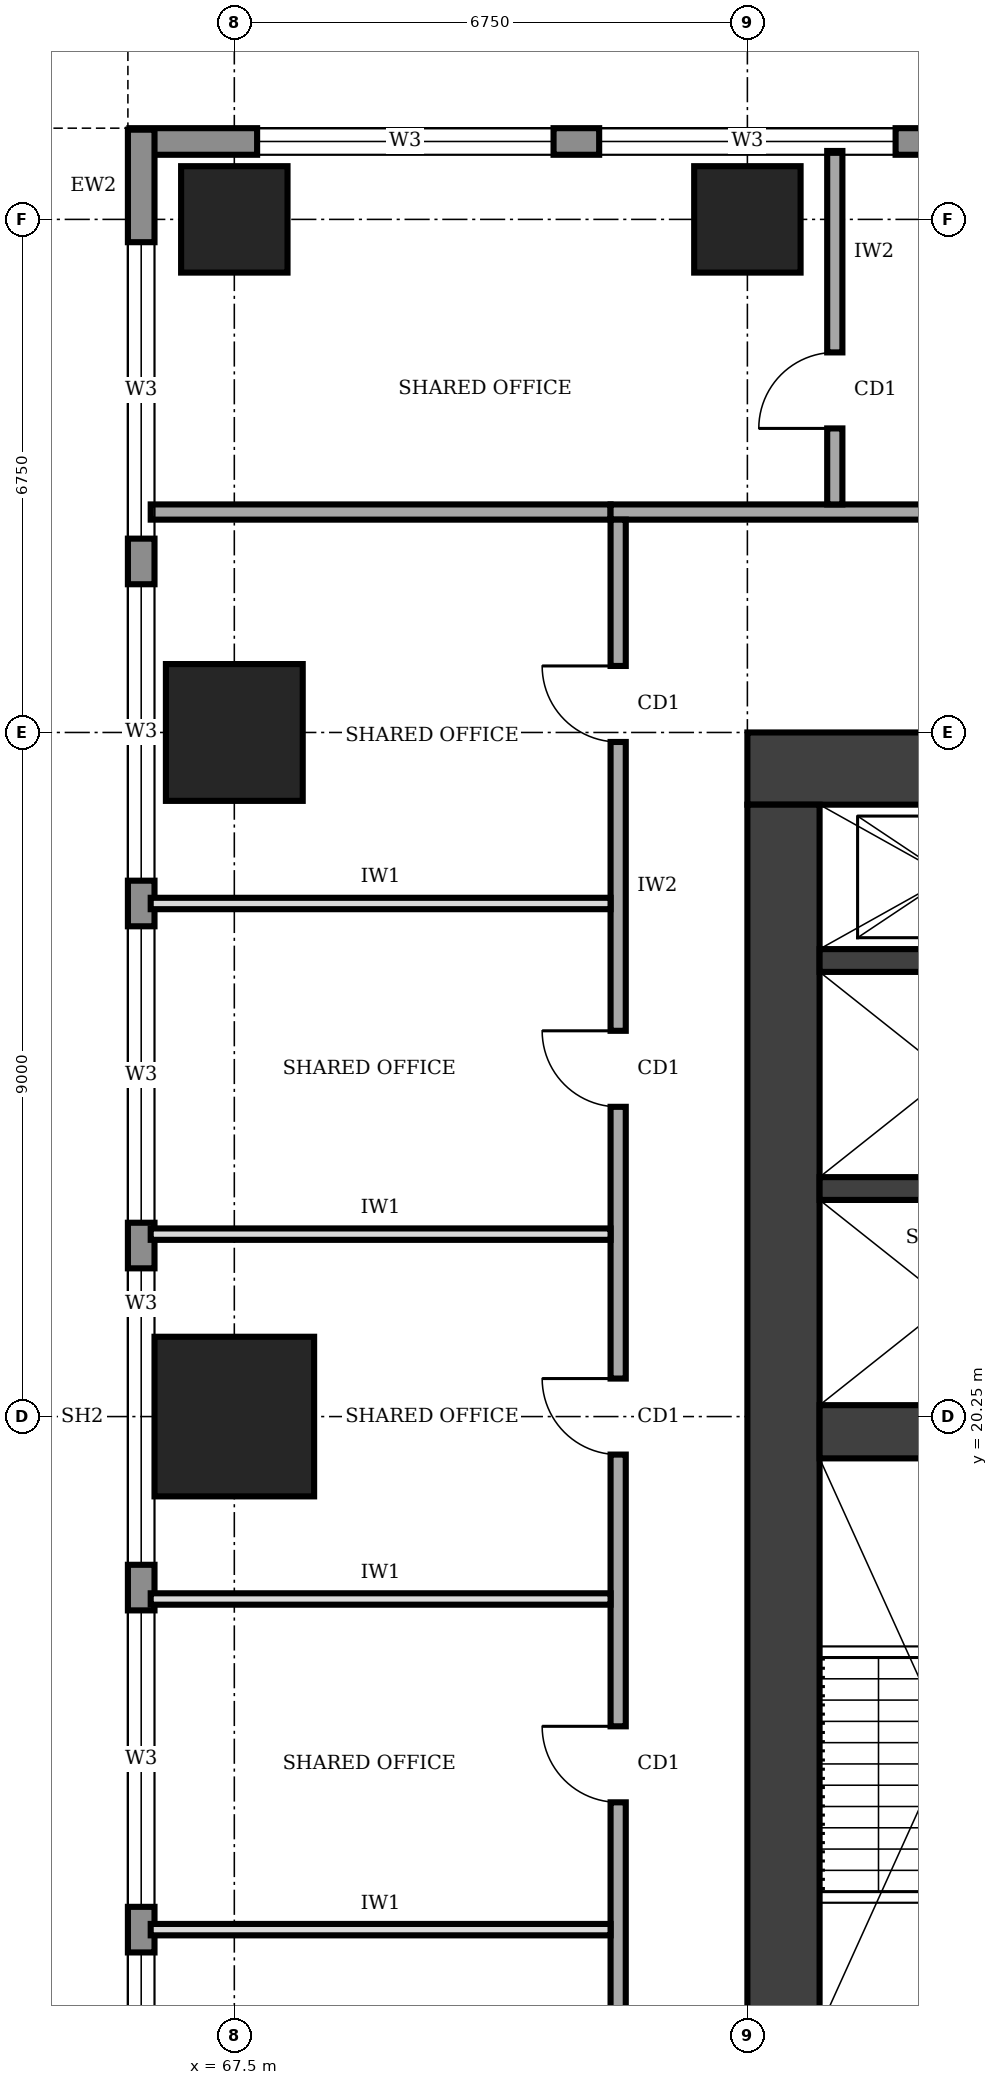
"""IFC4 building model, lengths in metres.
Left out: names, types, materials, properties, quantities, classifications, styles, units other than length and angle.
Written with IfcOpenShell. Run it as: python <this file> out.ifc"""

import sys

from ifc_helpers import new_model, si_unit, direction, frame, frame_2d, origin, origin_2d, place, context, subcontext, project, spatial, rectangle, extrude, element, fill, save


model = new_model("IFC4")
c1 = context("Model", 3, precision=1e-05, world=origin(), true_north=direction((0.0, 1.0)))
c2 = subcontext(c1, "Body", "Model", "MODEL_VIEW")
j1 = project(units=[si_unit("LENGTHUNIT", "METRE"), si_unit("PLANEANGLEUNIT", "RADIAN")], contexts=[c1])
p1 = place(None, origin())
s1 = spatial("IfcSite", under=j1, at=p1, CompositionType="ELEMENT")
p2 = place(p1, origin())
s2 = spatial("IfcBuilding", under=s1, at=p2, CompositionType="ELEMENT")
p3 = place(p2, frame((0.0, 0.0, 181.0)))
s3 = spatial("IfcBuildingStorey", under=s2, at=p3, CompositionType="ELEMENT", Elevation=181.0)
p4 = place(p3, frame((87.75, 28.775, 0.0), z_axis=(0.0, 0.0, 1.0), x_axis=(-1.0, 0.0, 0.0)))
e1 = element("IfcWall", 1, at=p4, inside=s3, PredefinedType="SHEAR", context=c2, shape_type="SweptSolid", body=[
    extrude(rectangle(XDim=13.5, YDim=0.95, at=frame_2d((6.75, 0.0))), origin(), (0.0, 0.0, 1.0), 4.0),
])
p5 = place(p4, frame((4.75, 0.0, 0.0)))
e2 = element("IfcOpeningElement", 2, at=p5, cuts=e1, PredefinedType="OPENING", context=c2, shape_type="SweptSolid", body=[
    extrude(rectangle(XDim=1.8, YDim=2.1, at=frame_2d((0.9, 1.05))), frame((0.0, 0.485, 0.0), z_axis=(0.0, -1.0, 0.0), x_axis=(1.0, 0.0, 0.0)), (0.0, 0.0, 1.0), 0.97),
])
p6 = place(p3, frame((74.725, 28.3, 0.0), z_axis=(0.0, 0.0, 1.0), x_axis=(0.0, -1.0, 0.0)))
e3 = element("IfcWall", 3, at=p6, inside=s3, PredefinedType="SHEAR", context=c2, shape_type="SweptSolid", body=[
    extrude(rectangle(XDim=16.1, YDim=0.95, at=frame_2d((8.05, 0.0))), origin(), (0.0, 0.0, 1.0), 4.0),
])
p7 = place(p3, frame((75.2, 20.05, 0.0), z_axis=(0.0, 0.0, 1.0), x_axis=(1.0, 0.0, 0.0)))
e4 = element("IfcWall", 4, at=p7, inside=s3, PredefinedType="SHEAR", context=c2, shape_type="SweptSolid", body=[
    extrude(rectangle(XDim=3.4, YDim=0.7, at=frame_2d((1.7, 0.0))), origin(), (0.0, 0.0, 1.0), 4.0),
])
for number, where, z_axis, x_axis in (
    (5, (75.2, 23.25, 0.0), (0.0, 0.0, 1.0), (1.0, 0.0, 0.0)),
    (6, (75.2, 26.25, 0.0), (0.0, 0.0, 1.0), (1.0, 0.0, 0.0)),
):
    element("IfcWall", number, at=place(p3, frame(where, z_axis=z_axis, x_axis=x_axis)), inside=s3, PredefinedType="SHEAR", context=c2, shape_type="SweptSolid", body=[
        extrude(rectangle(XDim=3.4, YDim=0.3, at=frame_2d((1.7, 0.0))), origin(), (0.0, 0.0, 1.0), 4.0),
    ])
p8 = place(p3, frame((67.5, 20.25, 0.0), z_axis=(0.0, 0.0, 1.0), x_axis=(1.0, 0.0, 0.0)))
e7 = element("IfcColumn", 7, at=p8, inside=s3, PredefinedType="COLUMN", context=c2, shape_type="SweptSolid", body=[
    extrude(rectangle(XDim=2.1, YDim=2.1, at=origin_2d()), origin(), (0.0, 0.0, 1.0), 4.0),
])
p9 = place(p3, frame((67.5, 29.25, 0.0), z_axis=(0.0, 0.0, 1.0), x_axis=(1.0, 0.0, 0.0)))
e8 = element("IfcColumn", 8, at=p9, inside=s3, PredefinedType="COLUMN", context=c2, shape_type="SweptSolid", body=[
    extrude(rectangle(XDim=1.8, YDim=1.8, at=origin_2d()), origin(), (0.0, 0.0, 1.0), 4.0),
])
for number, where, z_axis, x_axis in (
    (9, (67.5, 36.0, 0.0), (0.0, 0.0, 1.0), (1.0, 0.0, 0.0)),
    (10, (74.25, 36.0, 0.0), (0.0, 0.0, 1.0), (1.0, 0.0, 0.0)),
):
    element("IfcColumn", number, at=place(p3, frame(where, z_axis=z_axis, x_axis=x_axis)), inside=s3, PredefinedType="COLUMN", context=c2, shape_type="SweptSolid", body=[
        extrude(rectangle(XDim=1.4, YDim=1.4, at=origin_2d()), origin(), (0.0, 0.0, 1.0), 4.0),
    ])
p10 = place(p3, frame((96.03, 37.025, 0.0), z_axis=(0.0, 0.0, 1.0), x_axis=(-1.0, 0.0, 0.0)))
e11 = element("IfcWall", 11, at=p10, inside=s3, PredefinedType="STANDARD", context=c2, shape_type="SweptSolid", body=[
    extrude(rectangle(XDim=29.91, YDim=0.35, at=frame_2d((14.955, 0.0))), origin(), (0.0, 0.0, 1.0), 3.75),
])
p11 = place(p10, frame((24.33, 0.0, 0.95)))
e12 = element("IfcOpeningElement", 12, at=p11, cuts=e11, PredefinedType="OPENING", context=c2, shape_type="SweptSolid", body=[
    extrude(rectangle(XDim=3.9, YDim=1.8, at=frame_2d((1.95, 0.9))), frame((0.0, 0.185, 0.0), z_axis=(0.0, -1.0, 0.0), x_axis=(1.0, 0.0, 0.0)), (0.0, 0.0, 1.0), 0.37),
])
p12 = place(p10, frame((19.83, 0.0, 0.95)))
e13 = element("IfcOpeningElement", 13, at=p12, cuts=e11, PredefinedType="OPENING", context=c2, shape_type="SweptSolid", body=[
    extrude(rectangle(XDim=3.9, YDim=1.8, at=frame_2d((1.95, 0.9))), frame((0.0, 0.185, 0.0), z_axis=(0.0, -1.0, 0.0), x_axis=(1.0, 0.0, 0.0)), (0.0, 0.0, 1.0), 0.37),
])
p13 = place(p10, frame((15.33, 0.0, 0.95)))
e14 = element("IfcOpeningElement", 14, at=p13, cuts=e11, PredefinedType="OPENING", context=c2, shape_type="SweptSolid", body=[
    extrude(rectangle(XDim=3.9, YDim=1.8, at=frame_2d((1.95, 0.9))), frame((0.0, 0.185, 0.0), z_axis=(0.0, -1.0, 0.0), x_axis=(1.0, 0.0, 0.0)), (0.0, 0.0, 1.0), 0.37),
])
p14 = place(p10, frame((10.83, 0.0, 0.95)))
e15 = element("IfcOpeningElement", 15, at=p14, cuts=e11, PredefinedType="OPENING", context=c2, shape_type="SweptSolid", body=[
    extrude(rectangle(XDim=3.9, YDim=1.8, at=frame_2d((1.95, 0.9))), frame((0.0, 0.185, 0.0), z_axis=(0.0, -1.0, 0.0), x_axis=(1.0, 0.0, 0.0)), (0.0, 0.0, 1.0), 0.37),
])
p15 = place(p10, frame((6.33, 0.0, 0.95)))
e16 = element("IfcOpeningElement", 16, at=p15, cuts=e11, PredefinedType="OPENING", context=c2, shape_type="SweptSolid", body=[
    extrude(rectangle(XDim=3.9, YDim=1.8, at=frame_2d((1.95, 0.9))), frame((0.0, 0.185, 0.0), z_axis=(0.0, -1.0, 0.0), x_axis=(1.0, 0.0, 0.0)), (0.0, 0.0, 1.0), 0.37),
])
p16 = place(p10, frame((1.83, 0.0, 0.95)))
e17 = element("IfcOpeningElement", 17, at=p16, cuts=e11, PredefinedType="OPENING", context=c2, shape_type="SweptSolid", body=[
    extrude(rectangle(XDim=3.9, YDim=1.8, at=frame_2d((1.95, 0.9))), frame((0.0, 0.185, 0.0), z_axis=(0.0, -1.0, 0.0), x_axis=(1.0, 0.0, 0.0)), (0.0, 0.0, 1.0), 0.37),
])
p17 = place(p3, frame((66.275, 37.18, 0.0), z_axis=(0.0, 0.0, 1.0), x_axis=(0.0, -1.0, 0.0)))
e18 = element("IfcWall", 18, at=p17, inside=s3, PredefinedType="STANDARD", context=c2, shape_type="SweptSolid", body=[
    extrude(rectangle(XDim=33.86, YDim=0.35, at=frame_2d((16.93, 0.0))), origin(), (0.0, 0.0, 1.0), 3.75),
])
p18 = place(p17, frame((28.48, 0.0, 0.95)))
e19 = element("IfcOpeningElement", 19, at=p18, cuts=e18, PredefinedType="OPENING", context=c2, shape_type="SweptSolid", body=[
    extrude(rectangle(XDim=3.9, YDim=1.8, at=frame_2d((1.95, 0.9))), frame((0.0, 0.185, 0.0), z_axis=(0.0, -1.0, 0.0), x_axis=(1.0, 0.0, 0.0)), (0.0, 0.0, 1.0), 0.37),
])
p19 = place(p17, frame((23.98, 0.0, 0.95)))
e20 = element("IfcOpeningElement", 20, at=p19, cuts=e18, PredefinedType="OPENING", context=c2, shape_type="SweptSolid", body=[
    extrude(rectangle(XDim=3.9, YDim=1.8, at=frame_2d((1.95, 0.9))), frame((0.0, 0.185, 0.0), z_axis=(0.0, -1.0, 0.0), x_axis=(1.0, 0.0, 0.0)), (0.0, 0.0, 1.0), 0.37),
])
p20 = place(p17, frame((19.48, 0.0, 0.95)))
e21 = element("IfcOpeningElement", 21, at=p20, cuts=e18, PredefinedType="OPENING", context=c2, shape_type="SweptSolid", body=[
    extrude(rectangle(XDim=3.9, YDim=1.8, at=frame_2d((1.95, 0.9))), frame((0.0, 0.185, 0.0), z_axis=(0.0, -1.0, 0.0), x_axis=(1.0, 0.0, 0.0)), (0.0, 0.0, 1.0), 0.37),
])
p21 = place(p17, frame((14.98, 0.0, 0.95)))
e22 = element("IfcOpeningElement", 22, at=p21, cuts=e18, PredefinedType="OPENING", context=c2, shape_type="SweptSolid", body=[
    extrude(rectangle(XDim=3.9, YDim=1.8, at=frame_2d((1.95, 0.9))), frame((0.0, 0.185, 0.0), z_axis=(0.0, -1.0, 0.0), x_axis=(1.0, 0.0, 0.0)), (0.0, 0.0, 1.0), 0.37),
])
p22 = place(p17, frame((10.48, 0.0, 0.95)))
e23 = element("IfcOpeningElement", 23, at=p22, cuts=e18, PredefinedType="OPENING", context=c2, shape_type="SweptSolid", body=[
    extrude(rectangle(XDim=3.9, YDim=1.8, at=frame_2d((1.95, 0.9))), frame((0.0, 0.185, 0.0), z_axis=(0.0, -1.0, 0.0), x_axis=(1.0, 0.0, 0.0)), (0.0, 0.0, 1.0), 0.37),
])
p23 = place(p17, frame((5.98, 0.0, 0.95)))
e24 = element("IfcOpeningElement", 24, at=p23, cuts=e18, PredefinedType="OPENING", context=c2, shape_type="SweptSolid", body=[
    extrude(rectangle(XDim=3.9, YDim=1.8, at=frame_2d((1.95, 0.9))), frame((0.0, 0.185, 0.0), z_axis=(0.0, -1.0, 0.0), x_axis=(1.0, 0.0, 0.0)), (0.0, 0.0, 1.0), 0.37),
])
p24 = place(p17, frame((1.48, 0.0, 0.95)))
e25 = element("IfcOpeningElement", 25, at=p24, cuts=e18, PredefinedType="OPENING", context=c2, shape_type="SweptSolid", body=[
    extrude(rectangle(XDim=3.9, YDim=1.8, at=frame_2d((1.95, 0.9))), frame((0.0, 0.185, 0.0), z_axis=(0.0, -1.0, 0.0), x_axis=(1.0, 0.0, 0.0)), (0.0, 0.0, 1.0), 0.37),
])
p25 = place(p3, frame((89.35, 32.15, 0.0), z_axis=(0.0, 0.0, 1.0), x_axis=(-1.0, 0.0, 0.0)))
e26 = element("IfcWall", 26, at=p25, inside=s3, PredefinedType="SOLIDWALL", context=c2, shape_type="SweptSolid", body=[
    extrude(rectangle(XDim=16.9, YDim=0.2, at=frame_2d((8.45, 0.0))), origin(), (0.0, 0.0, 1.0), 3.75),
])
p26 = place(p25, frame((3.575, 0.0, 0.0)))
e27 = element("IfcOpeningElement", 27, at=p26, cuts=e26, PredefinedType="OPENING", context=c2, shape_type="SweptSolid", body=[
    extrude(rectangle(XDim=1.0, YDim=2.1, at=frame_2d((0.5, 1.05))), frame((0.0, 0.11, 0.0), z_axis=(0.0, -1.0, 0.0), x_axis=(1.0, 0.0, 0.0)), (0.0, 0.0, 1.0), 0.22),
])
p27 = place(p3, frame((72.55, 32.05, 0.0), z_axis=(0.0, 0.0, 1.0), x_axis=(0.0, -1.0, 0.0)))
e28 = element("IfcWall", 28, at=p27, inside=s3, PredefinedType="SOLIDWALL", context=c2, shape_type="SweptSolid", body=[
    extrude(rectangle(XDim=23.05, YDim=0.2, at=frame_2d((11.525, 0.0))), origin(), (0.0, 0.0, 1.0), 3.75),
])
p28 = place(p27, frame((20.3, 0.0, 0.0)))
e29 = element("IfcOpeningElement", 29, at=p28, cuts=e28, PredefinedType="OPENING", context=c2, shape_type="SweptSolid", body=[
    extrude(rectangle(XDim=1.0, YDim=2.1, at=frame_2d((0.5, 1.05))), frame((0.0, 0.11, 0.0), z_axis=(0.0, -1.0, 0.0), x_axis=(1.0, 0.0, 0.0)), (0.0, 0.0, 1.0), 0.22),
])
p29 = place(p27, frame((15.875, 0.0, 0.0)))
e30 = element("IfcOpeningElement", 30, at=p29, cuts=e28, PredefinedType="OPENING", context=c2, shape_type="SweptSolid", body=[
    extrude(rectangle(XDim=1.0, YDim=2.1, at=frame_2d((0.5, 1.05))), frame((0.0, 0.11, 0.0), z_axis=(0.0, -1.0, 0.0), x_axis=(1.0, 0.0, 0.0)), (0.0, 0.0, 1.0), 0.22),
])
p30 = place(p27, frame((11.3, 0.0, 0.0)))
e31 = element("IfcOpeningElement", 31, at=p30, cuts=e28, PredefinedType="OPENING", context=c2, shape_type="SweptSolid", body=[
    extrude(rectangle(XDim=1.0, YDim=2.1, at=frame_2d((0.5, 1.05))), frame((0.0, 0.11, 0.0), z_axis=(0.0, -1.0, 0.0), x_axis=(1.0, 0.0, 0.0)), (0.0, 0.0, 1.0), 0.22),
])
p31 = place(p27, frame((6.725, 0.0, 0.0)))
e32 = element("IfcOpeningElement", 32, at=p31, cuts=e28, PredefinedType="OPENING", context=c2, shape_type="SweptSolid", body=[
    extrude(rectangle(XDim=1.0, YDim=2.1, at=frame_2d((0.5, 1.05))), frame((0.0, 0.11, 0.0), z_axis=(0.0, -1.0, 0.0), x_axis=(1.0, 0.0, 0.0)), (0.0, 0.0, 1.0), 0.22),
])
p32 = place(p27, frame((1.925, 0.0, 0.0)))
e33 = element("IfcOpeningElement", 33, at=p32, cuts=e28, PredefinedType="OPENING", context=c2, shape_type="SweptSolid", body=[
    extrude(rectangle(XDim=1.0, YDim=2.1, at=frame_2d((0.5, 1.05))), frame((0.0, 0.11, 0.0), z_axis=(0.0, -1.0, 0.0), x_axis=(1.0, 0.0, 0.0)), (0.0, 0.0, 1.0), 0.22),
])
p33 = place(p3, frame((75.4, 32.25, 0.0), z_axis=(0.0, 0.0, 1.0), x_axis=(0.0, 1.0, 0.0)))
e34 = element("IfcWall", 34, at=p33, inside=s3, PredefinedType="SOLIDWALL", context=c2, shape_type="SweptSolid", body=[
    extrude(rectangle(XDim=4.65, YDim=0.2, at=frame_2d((2.325, 0.0))), origin(), (0.0, 0.0, 1.0), 3.75),
])
p34 = place(p33, frame((1.0, 0.0, 0.0)))
e35 = element("IfcOpeningElement", 35, at=p34, cuts=e34, PredefinedType="OPENING", context=c2, shape_type="SweptSolid", body=[
    extrude(rectangle(XDim=1.0, YDim=2.1, at=frame_2d((0.5, 1.05))), frame((0.0, 0.11, 0.0), z_axis=(0.0, -1.0, 0.0), x_axis=(1.0, 0.0, 0.0)), (0.0, 0.0, 1.0), 0.22),
])
p35 = place(p3, frame((66.4, 32.15, 0.0), z_axis=(0.0, 0.0, 1.0), x_axis=(1.0, 0.0, 0.0)))
e36 = element("IfcWall", 36, at=p35, inside=s3, PredefinedType="SOLIDWALL", context=c2, shape_type="SweptSolid", body=[
    extrude(rectangle(XDim=6.05, YDim=0.2, at=frame_2d((3.025, 0.0))), origin(), (0.0, 0.0, 1.0), 3.75),
])
for number, where, z_axis, x_axis in (
    (37, (66.4, 13.5, 0.0), (0.0, 0.0, 1.0), (1.0, 0.0, 0.0)),
    (38, (66.4, 17.85, 0.0), (0.0, 0.0, 1.0), (1.0, 0.0, 0.0)),
    (39, (66.4, 22.65, 0.0), (0.0, 0.0, 1.0), (1.0, 0.0, 0.0)),
    (40, (66.4, 27.0, 0.0), (0.0, 0.0, 1.0), (1.0, 0.0, 0.0)),
):
    element("IfcWall", number, at=place(p3, frame(where, z_axis=z_axis, x_axis=x_axis)), inside=s3, PredefinedType="PARTITIONING", context=c2, shape_type="SweptSolid", body=[
        extrude(rectangle(XDim=6.05, YDim=0.15, at=frame_2d((3.025, 0.0))), origin(), (0.0, 0.0, 1.0), 3.75),
    ])
p36 = place(p11, origin())
e41 = element("IfcWindow", 41, at=p36, inside=s3, PartitioningType="SINGLE_PANEL", PredefinedType="WINDOW", context=c2, shape_type="SweptSolid", body=[
    extrude(rectangle(XDim=3.9, YDim=1.8, at=frame_2d((1.95, 0.9))), frame((0.0, 0.03, 0.0), z_axis=(0.0, -1.0, 0.0), x_axis=(1.0, 0.0, 0.0)), (0.0, 0.0, 1.0), 0.06),
])
fill(e12, e41)
p37 = place(p12, origin())
e42 = element("IfcWindow", 42, at=p37, inside=s3, PartitioningType="SINGLE_PANEL", PredefinedType="WINDOW", context=c2, shape_type="SweptSolid", body=[
    extrude(rectangle(XDim=3.9, YDim=1.8, at=frame_2d((1.95, 0.9))), frame((0.0, 0.03, 0.0), z_axis=(0.0, -1.0, 0.0), x_axis=(1.0, 0.0, 0.0)), (0.0, 0.0, 1.0), 0.06),
])
fill(e13, e42)
p38 = place(p19, origin())
e43 = element("IfcWindow", 43, at=p38, inside=s3, PartitioningType="SINGLE_PANEL", PredefinedType="WINDOW", context=c2, shape_type="SweptSolid", body=[
    extrude(rectangle(XDim=3.9, YDim=1.8, at=frame_2d((1.95, 0.9))), frame((0.0, 0.03, 0.0), z_axis=(0.0, -1.0, 0.0), x_axis=(1.0, 0.0, 0.0)), (0.0, 0.0, 1.0), 0.06),
])
fill(e20, e43)
p39 = place(p20, origin())
e44 = element("IfcWindow", 44, at=p39, inside=s3, PartitioningType="SINGLE_PANEL", PredefinedType="WINDOW", context=c2, shape_type="SweptSolid", body=[
    extrude(rectangle(XDim=3.9, YDim=1.8, at=frame_2d((1.95, 0.9))), frame((0.0, 0.03, 0.0), z_axis=(0.0, -1.0, 0.0), x_axis=(1.0, 0.0, 0.0)), (0.0, 0.0, 1.0), 0.06),
])
fill(e21, e44)
p40 = place(p21, origin())
e45 = element("IfcWindow", 45, at=p40, inside=s3, PartitioningType="SINGLE_PANEL", PredefinedType="WINDOW", context=c2, shape_type="SweptSolid", body=[
    extrude(rectangle(XDim=3.9, YDim=1.8, at=frame_2d((1.95, 0.9))), frame((0.0, 0.03, 0.0), z_axis=(0.0, -1.0, 0.0), x_axis=(1.0, 0.0, 0.0)), (0.0, 0.0, 1.0), 0.06),
])
fill(e22, e45)
p41 = place(p22, origin())
e46 = element("IfcWindow", 46, at=p41, inside=s3, PartitioningType="SINGLE_PANEL", PredefinedType="WINDOW", context=c2, shape_type="SweptSolid", body=[
    extrude(rectangle(XDim=3.9, YDim=1.8, at=frame_2d((1.95, 0.9))), frame((0.0, 0.03, 0.0), z_axis=(0.0, -1.0, 0.0), x_axis=(1.0, 0.0, 0.0)), (0.0, 0.0, 1.0), 0.06),
])
fill(e23, e46)
p42 = place(p23, origin())
e47 = element("IfcWindow", 47, at=p42, inside=s3, PartitioningType="SINGLE_PANEL", PredefinedType="WINDOW", context=c2, shape_type="SweptSolid", body=[
    extrude(rectangle(XDim=3.9, YDim=1.8, at=frame_2d((1.95, 0.9))), frame((0.0, 0.03, 0.0), z_axis=(0.0, -1.0, 0.0), x_axis=(1.0, 0.0, 0.0)), (0.0, 0.0, 1.0), 0.06),
])
fill(e24, e47)
p43 = place(p24, origin())
e48 = element("IfcWindow", 48, at=p43, inside=s3, PartitioningType="SINGLE_PANEL", PredefinedType="WINDOW", context=c2, shape_type="SweptSolid", body=[
    extrude(rectangle(XDim=3.9, YDim=1.8, at=frame_2d((1.95, 0.9))), frame((0.0, 0.03, 0.0), z_axis=(0.0, -1.0, 0.0), x_axis=(1.0, 0.0, 0.0)), (0.0, 0.0, 1.0), 0.06),
])
fill(e25, e48)
p44 = place(p29, frame((1.0, 0.0, 0.0), z_axis=(0.0, 0.0, 1.0), x_axis=(-1.0, 0.0, 0.0)))
e49 = element("IfcDoor", 49, at=p44, inside=s3, OperationType="SINGLE_SWING_RIGHT", PredefinedType="DOOR", context=c2, shape_type="SweptSolid", body=[
    extrude(rectangle(XDim=1.0, YDim=2.1, at=frame_2d((0.5, 1.05))), frame((0.0, 0.025, 0.0), z_axis=(0.0, -1.0, 0.0), x_axis=(1.0, 0.0, 0.0)), (0.0, 0.0, 1.0), 0.05),
])
fill(e30, e49)
p45 = place(p30, frame((1.0, 0.0, 0.0), z_axis=(0.0, 0.0, 1.0), x_axis=(-1.0, 0.0, 0.0)))
e50 = element("IfcDoor", 50, at=p45, inside=s3, OperationType="SINGLE_SWING_RIGHT", PredefinedType="DOOR", context=c2, shape_type="SweptSolid", body=[
    extrude(rectangle(XDim=1.0, YDim=2.1, at=frame_2d((0.5, 1.05))), frame((0.0, 0.025, 0.0), z_axis=(0.0, -1.0, 0.0), x_axis=(1.0, 0.0, 0.0)), (0.0, 0.0, 1.0), 0.05),
])
fill(e31, e50)
p46 = place(p31, frame((1.0, 0.0, 0.0), z_axis=(0.0, 0.0, 1.0), x_axis=(-1.0, 0.0, 0.0)))
e51 = element("IfcDoor", 51, at=p46, inside=s3, OperationType="SINGLE_SWING_RIGHT", PredefinedType="DOOR", context=c2, shape_type="SweptSolid", body=[
    extrude(rectangle(XDim=1.0, YDim=2.1, at=frame_2d((0.5, 1.05))), frame((0.0, 0.025, 0.0), z_axis=(0.0, -1.0, 0.0), x_axis=(1.0, 0.0, 0.0)), (0.0, 0.0, 1.0), 0.05),
])
fill(e32, e51)
p47 = place(p32, frame((1.0, 0.0, 0.0), z_axis=(0.0, 0.0, 1.0), x_axis=(-1.0, 0.0, 0.0)))
e52 = element("IfcDoor", 52, at=p47, inside=s3, OperationType="SINGLE_SWING_RIGHT", PredefinedType="DOOR", context=c2, shape_type="SweptSolid", body=[
    extrude(rectangle(XDim=1.0, YDim=2.1, at=frame_2d((0.5, 1.05))), frame((0.0, 0.025, 0.0), z_axis=(0.0, -1.0, 0.0), x_axis=(1.0, 0.0, 0.0)), (0.0, 0.0, 1.0), 0.05),
])
fill(e33, e52)
p48 = place(p34, origin())
e53 = element("IfcDoor", 53, at=p48, inside=s3, OperationType="SINGLE_SWING_LEFT", PredefinedType="DOOR", context=c2, shape_type="SweptSolid", body=[
    extrude(rectangle(XDim=1.0, YDim=2.1, at=frame_2d((0.5, 1.05))), frame((0.0, 0.025, 0.0), z_axis=(0.0, -1.0, 0.0), x_axis=(1.0, 0.0, 0.0)), (0.0, 0.0, 1.0), 0.05),
])
fill(e35, e53)
save(model, sys.argv[1])
